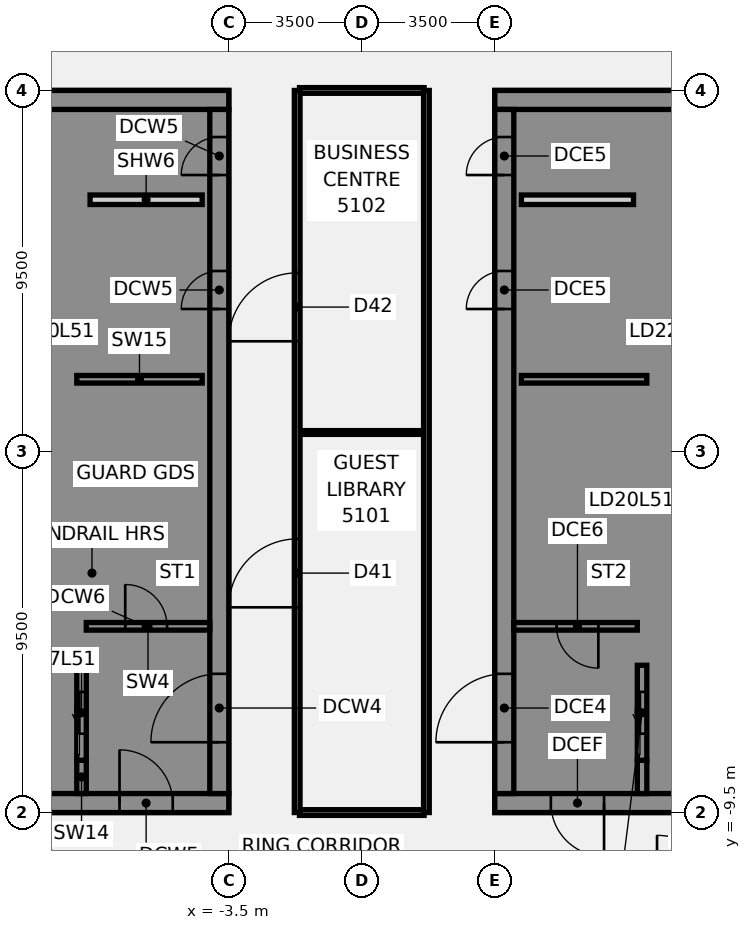
"""IFC4 building model, lengths in metres.
Left out: names, types, materials, properties, quantities, classifications, styles, units other than length and angle.
Written with IfcOpenShell. Run it as: python <this file> out.ifc"""

import sys

from ifc_helpers import new_model, si_unit, direction, frame, frame_2d, origin, place, context, subcontext, project, spatial, polyline, rectangle, outline, extrude, element, fill, save


model = new_model("IFC4")
c1 = context("Model", 3, precision=1e-05, world=origin(), true_north=direction((0.0, 1.0)))
c2 = subcontext(c1, "Body", "Model", "MODEL_VIEW")
j1 = project(units=[si_unit("LENGTHUNIT", "METRE"), si_unit("PLANEANGLEUNIT", "RADIAN")], contexts=[c1])
p1 = place(None, origin())
s1 = spatial("IfcSite", under=j1, at=p1, CompositionType="ELEMENT")
p2 = place(p1, origin())
s2 = spatial("IfcBuilding", under=s1, at=p2, CompositionType="ELEMENT")
p3 = place(p2, frame((0.0, 0.0, 204.1)))
s3 = spatial("IfcBuildingStorey", under=s2, at=p3, CompositionType="ELEMENT", Elevation=204.1)
p4 = place(p3, frame((-1.64, -9.5, 0.0), z_axis=(0.0, 0.0, 1.0), x_axis=(1.0, 0.0, 0.0)))
e1 = element("IfcWall", 1, at=p4, inside=s3, PredefinedType="PARTITIONING", context=c2, shape_type="SweptSolid", body=[
    extrude(rectangle(XDim=3.28, YDim=0.15, at=frame_2d((1.64, 0.0))), origin(), (0.0, 0.0, 1.0), 2.864),
])
p5 = place(p3, frame((-1.64, 0.5, 0.0), z_axis=(0.0, 0.0, 1.0), x_axis=(1.0, 0.0, 0.0)))
e2 = element("IfcWall", 2, at=p5, inside=s3, PredefinedType="PARTITIONING", context=c2, shape_type="SweptSolid", body=[
    extrude(rectangle(XDim=3.28, YDim=0.1, at=frame_2d((1.64, 0.0))), origin(), (0.0, 0.0, 1.0), 2.864),
])
p6 = place(p3, frame((-1.64, 9.5, 0.0), z_axis=(0.0, 0.0, 1.0), x_axis=(1.0, 0.0, 0.0)))
e3 = element("IfcWall", 3, at=p6, inside=s3, PredefinedType="PARTITIONING", context=c2, shape_type="SweptSolid", body=[
    extrude(rectangle(XDim=3.28, YDim=0.15, at=frame_2d((1.64, 0.0))), origin(), (0.0, 0.0, 1.0), 2.864),
])
p7 = place(p3, frame((-1.7, -9.5, 0.0), z_axis=(0.0, 0.0, 1.0), x_axis=(0.0, 1.0, 0.0)))
e4 = element("IfcWall", 4, at=p7, inside=s3, PredefinedType="PARTITIONING", context=c2, shape_type="SweptSolid", body=[
    extrude(rectangle(XDim=19.0, YDim=0.15, at=frame_2d((9.5, 0.0))), origin(), (0.0, 0.0, 1.0), 2.864),
])
p8 = place(p7, frame((5.4, 0.0, 0.0)))
e5 = element("IfcOpeningElement", 5, at=p8, cuts=e4, PredefinedType="OPENING", context=c2, shape_type="SweptSolid", body=[
    extrude(rectangle(XDim=1.8, YDim=2.1, at=frame_2d((0.9, 1.05))), frame((0.0, 0.085, 0.0), z_axis=(0.0, -1.0, 0.0), x_axis=(1.0, 0.0, 0.0)), (0.0, 0.0, 1.0), 0.17),
])
p9 = place(p7, frame((12.4, 0.0, 0.0)))
e6 = element("IfcOpeningElement", 6, at=p9, cuts=e4, PredefinedType="OPENING", context=c2, shape_type="SweptSolid", body=[
    extrude(rectangle(XDim=1.8, YDim=2.1, at=frame_2d((0.9, 1.05))), frame((0.0, 0.085, 0.0), z_axis=(0.0, -1.0, 0.0), x_axis=(1.0, 0.0, 0.0)), (0.0, 0.0, 1.0), 0.17),
])
p10 = place(p3, frame((1.7, -9.5, 0.0), z_axis=(0.0, 0.0, 1.0), x_axis=(0.0, 1.0, 0.0)))
e7 = element("IfcWall", 7, at=p10, inside=s3, PredefinedType="PARTITIONING", context=c2, shape_type="SweptSolid", body=[
    extrude(rectangle(XDim=19.0, YDim=0.15, at=frame_2d((9.5, 0.0))), origin(), (0.0, 0.0, 1.0), 2.864),
])
p11 = place(p3, frame((-16.5, -9.25, 0.0), z_axis=(0.0, 0.0, 1.0), x_axis=(1.0, 0.0, 0.0)))
e8 = element("IfcWall", 8, at=p11, inside=s3, PredefinedType="SHEAR", context=c2, shape_type="SweptSolid", body=[
    extrude(rectangle(XDim=13.0, YDim=0.5, at=frame_2d((6.5, 0.0))), origin(), (0.0, 0.0, 1.0), 3.46),
])
p12 = place(p11, frame((4.15, 0.0, 0.0)))
e9 = element("IfcOpeningElement", 9, at=p12, cuts=e8, PredefinedType="OPENING", context=c2, shape_type="SweptSolid", body=[
    extrude(rectangle(XDim=1.4, YDim=2.1, at=frame_2d((0.7, 1.05))), frame((0.0, 0.26, 0.0), z_axis=(0.0, -1.0, 0.0), x_axis=(1.0, 0.0, 0.0)), (0.0, 0.0, 1.0), 0.52),
])
p13 = place(p11, frame((10.125, 0.0, 0.0)))
e10 = element("IfcOpeningElement", 10, at=p13, cuts=e8, PredefinedType="OPENING", context=c2, shape_type="SweptSolid", body=[
    extrude(rectangle(XDim=1.4, YDim=2.1, at=frame_2d((0.7, 1.05))), frame((0.0, 0.26, 0.0), z_axis=(0.0, -1.0, 0.0), x_axis=(1.0, 0.0, 0.0)), (0.0, 0.0, 1.0), 0.52),
])
p14 = place(p3, frame((-16.5, 9.25, 0.0), z_axis=(0.0, 0.0, 1.0), x_axis=(1.0, 0.0, 0.0)))
e11 = element("IfcWall", 11, at=p14, inside=s3, PredefinedType="SHEAR", context=c2, shape_type="SweptSolid", body=[
    extrude(rectangle(XDim=13.0, YDim=0.5, at=frame_2d((6.5, 0.0))), origin(), (0.0, 0.0, 1.0), 3.46),
])
p15 = place(p3, origin())
e12 = element("IfcWall", 12, at=p15, inside=s3, PredefinedType="SHEAR", context=c2, shape_type="SweptSolid", body=[
    extrude(outline(polyline([(-9.8, -5.375), (-9.8, -5.625), (-7.5, -5.625), (-7.25, -5.625), (-7.25, 9.0), (-7.5, 9.0), (-9.8, 9.0), (-9.8, 8.125), (-7.5, 8.125), (-7.5, 5.625), (-9.8, 5.625), (-9.8, 5.375), (-7.5, 5.375), (-7.5, 2.875), (-9.8, 2.875), (-9.8, 2.625), (-7.5, 2.625), (-7.5, 0.125), (-9.8, 0.125), (-9.8, -0.125), (-7.5, -0.125), (-7.5, -2.625), (-9.8, -2.625), (-9.8, -2.875), (-7.5, -2.875), (-7.5, -5.375), (-9.8, -5.375)])), origin(), (0.0, 0.0, 1.0), 3.46),
])
p16 = place(p3, origin())
e13 = element("IfcWall", 13, at=p16, inside=s3, PredefinedType="SHEAR", context=c2, shape_type="SweptSolid", body=[
    extrude(outline(polyline([(-7.5, -8.125), (-9.55, -8.125), (-9.55, -5.625), (-9.8, -5.625), (-9.8, -8.125), (-9.8, -9.0), (-7.5, -9.0), (-7.5, -8.125)])), origin(), (0.0, 0.0, 1.0), 3.46),
])
p17 = place(p3, frame((-7.375, -9.0, 0.0), z_axis=(0.0, 0.0, 1.0), x_axis=(0.0, 1.0, 0.0)))
e14 = element("IfcWall", 14, at=p17, inside=s3, PredefinedType="SHEAR", context=c2, shape_type="SweptSolid", body=[
    extrude(rectangle(XDim=0.875, YDim=0.25, at=frame_2d((0.438, 0.0))), origin(), (0.0, 0.0, 1.0), 3.46),
])
p18 = place(p3, frame((-7.5, 1.9, 0.0), z_axis=(0.0, 0.0, 1.0), x_axis=(1.0, 0.0, 0.0)))
e15 = element("IfcWall", 15, at=p18, inside=s3, PredefinedType="SHEAR", context=c2, shape_type="SweptSolid", body=[
    extrude(rectangle(XDim=3.3, YDim=0.2, at=frame_2d((1.65, 0.0))), origin(), (0.0, 0.0, 1.0), 3.46),
])
p19 = place(p3, frame((-7.375, -8.125, 0.0), z_axis=(0.0, 0.0, 1.0), x_axis=(0.0, 1.0, 0.0)))
e16 = element("IfcWall", 16, at=p19, inside=s3, PredefinedType="SHEAR", context=c2, shape_type="SweptSolid", body=[
    extrude(rectangle(XDim=2.5, YDim=0.25, at=frame_2d((1.25, 0.0))), origin(), (0.0, 0.0, 1.0), 3.46),
])
p20 = place(p19, frame((0.7, 0.0, 0.0)))
e17 = element("IfcOpeningElement", 17, at=p20, cuts=e16, PredefinedType="OPENING", context=c2, shape_type="SweptSolid", body=[
    extrude(rectangle(XDim=1.1, YDim=2.1, at=frame_2d((0.55, 1.05))), frame((0.0, 0.135, 0.0), z_axis=(0.0, -1.0, 0.0), x_axis=(1.0, 0.0, 0.0)), (0.0, 0.0, 1.0), 0.27),
])
p21 = place(p3, frame((-3.75, -9.0, 0.0), z_axis=(0.0, 0.0, 1.0), x_axis=(0.0, 1.0, 0.0)))
e18 = element("IfcWall", 18, at=p21, inside=s3, PredefinedType="SHEAR", context=c2, shape_type="SweptSolid", body=[
    extrude(rectangle(XDim=18.0, YDim=0.5, at=frame_2d((9.0, 0.0))), origin(), (0.0, 0.0, 1.0), 3.46),
])
p22 = place(p21, frame((1.35, 0.0, 0.0)))
e19 = element("IfcOpeningElement", 19, at=p22, cuts=e18, PredefinedType="OPENING", context=c2, shape_type="SweptSolid", body=[
    extrude(rectangle(XDim=1.8, YDim=2.1, at=frame_2d((0.9, 1.05))), frame((0.0, 0.26, 0.0), z_axis=(0.0, -1.0, 0.0), x_axis=(1.0, 0.0, 0.0)), (0.0, 0.0, 1.0), 0.52),
])
p23 = place(p21, frame((12.75, 0.0, 0.0)))
e20 = element("IfcOpeningElement", 20, at=p23, cuts=e18, PredefinedType="OPENING", context=c2, shape_type="SweptSolid", body=[
    extrude(rectangle(XDim=1.0, YDim=2.1, at=frame_2d((0.5, 1.05))), frame((0.0, 0.26, 0.0), z_axis=(0.0, -1.0, 0.0), x_axis=(1.0, 0.0, 0.0)), (0.0, 0.0, 1.0), 0.52),
])
p24 = place(p21, frame((16.274, 0.0, 0.0)))
e21 = element("IfcOpeningElement", 21, at=p24, cuts=e18, PredefinedType="OPENING", context=c2, shape_type="SweptSolid", body=[
    extrude(rectangle(XDim=1.0, YDim=2.1, at=frame_2d((0.5, 1.05))), frame((0.0, 0.26, 0.0), z_axis=(0.0, -1.0, 0.0), x_axis=(1.0, 0.0, 0.0)), (0.0, 0.0, 1.0), 0.52),
])
p25 = place(p3, frame((-7.15, 6.624, 0.0), z_axis=(0.0, 0.0, 1.0), x_axis=(1.0, 0.0, 0.0)))
e22 = element("IfcWall", 22, at=p25, inside=s3, PredefinedType="PARTITIONING", context=c2, shape_type="SweptSolid", body=[
    extrude(rectangle(XDim=2.95, YDim=0.25, at=frame_2d((1.475, 0.0))), origin(), (0.0, 0.0, 1.0), 3.46),
])
p26 = place(p3, frame((-7.25, -4.6, 0.0), z_axis=(0.0, 0.0, 1.0), x_axis=(1.0, 0.0, 0.0)))
e23 = element("IfcWall", 23, at=p26, inside=s3, PredefinedType="SHEAR", context=c2, shape_type="SweptSolid", body=[
    extrude(rectangle(XDim=3.25, YDim=0.2, at=frame_2d((1.625, 0.0))), origin(), (0.0, 0.0, 1.0), 3.46),
])
p27 = place(p26, frame((1.025, 0.0, 0.0)))
e24 = element("IfcOpeningElement", 24, at=p27, cuts=e23, PredefinedType="OPENING", context=c2, shape_type="SweptSolid", body=[
    extrude(rectangle(XDim=1.1, YDim=2.1, at=frame_2d((0.55, 1.05))), frame((0.0, 0.11, 0.0), z_axis=(0.0, -1.0, 0.0), x_axis=(1.0, 0.0, 0.0)), (0.0, 0.0, 1.0), 0.22),
])
p28 = place(p3, frame((16.5, -9.25, 0.0), z_axis=(0.0, 0.0, 1.0), x_axis=(-1.0, 0.0, 0.0)))
e25 = element("IfcWall", 25, at=p28, inside=s3, PredefinedType="SHEAR", context=c2, shape_type="SweptSolid", body=[
    extrude(rectangle(XDim=13.0, YDim=0.5, at=frame_2d((6.5, 0.0))), origin(), (0.0, 0.0, 1.0), 3.46),
])
p29 = place(p28, frame((4.15, 0.0, 0.0)))
e26 = element("IfcOpeningElement", 26, at=p29, cuts=e25, PredefinedType="OPENING", context=c2, shape_type="SweptSolid", body=[
    extrude(rectangle(XDim=1.4, YDim=2.1, at=frame_2d((0.7, 1.05))), frame((0.0, 0.26, 0.0), z_axis=(0.0, -1.0, 0.0), x_axis=(1.0, 0.0, 0.0)), (0.0, 0.0, 1.0), 0.52),
])
p30 = place(p28, frame((10.125, 0.0, 0.0)))
e27 = element("IfcOpeningElement", 27, at=p30, cuts=e25, PredefinedType="OPENING", context=c2, shape_type="SweptSolid", body=[
    extrude(rectangle(XDim=1.4, YDim=2.1, at=frame_2d((0.7, 1.05))), frame((0.0, 0.26, 0.0), z_axis=(0.0, -1.0, 0.0), x_axis=(1.0, 0.0, 0.0)), (0.0, 0.0, 1.0), 0.52),
])
p31 = place(p3, frame((16.5, 9.25, 0.0), z_axis=(0.0, 0.0, 1.0), x_axis=(-1.0, 0.0, 0.0)))
e28 = element("IfcWall", 28, at=p31, inside=s3, PredefinedType="SHEAR", context=c2, shape_type="SweptSolid", body=[
    extrude(rectangle(XDim=13.0, YDim=0.5, at=frame_2d((6.5, 0.0))), origin(), (0.0, 0.0, 1.0), 3.46),
])
p32 = place(p3, origin())
e29 = element("IfcWall", 29, at=p32, inside=s3, PredefinedType="SHEAR", context=c2, shape_type="SweptSolid", body=[
    extrude(outline(polyline([(9.8, -5.375), (7.5, -5.375), (7.5, -2.875), (9.8, -2.875), (9.8, -2.625), (7.5, -2.625), (7.5, -0.125), (9.8, -0.125), (9.8, 0.125), (7.5, 0.125), (7.5, 2.625), (9.8, 2.625), (9.8, 2.875), (7.5, 2.875), (7.5, 5.375), (9.8, 5.375), (9.8, 5.625), (7.5, 5.625), (7.5, 8.125), (9.8, 8.125), (9.8, 9.0), (7.5, 9.0), (7.25, 9.0), (7.25, -5.625), (7.5, -5.625), (9.8, -5.625), (9.8, -5.375)])), origin(), (0.0, 0.0, 1.0), 3.46),
])
p33 = place(p3, origin())
e30 = element("IfcWall", 30, at=p33, inside=s3, PredefinedType="SHEAR", context=c2, shape_type="SweptSolid", body=[
    extrude(outline(polyline([(7.5, -8.125), (7.5, -9.0), (9.8, -9.0), (9.8, -8.125), (9.8, -5.625), (9.55, -5.625), (9.55, -8.125), (7.5, -8.125)])), origin(), (0.0, 0.0, 1.0), 3.46),
])
p34 = place(p3, frame((7.375, -9.0, 0.0), z_axis=(0.0, 0.0, 1.0), x_axis=(0.0, 1.0, 0.0)))
e31 = element("IfcWall", 31, at=p34, inside=s3, PredefinedType="SHEAR", context=c2, shape_type="SweptSolid", body=[
    extrude(rectangle(XDim=0.875, YDim=0.25, at=frame_2d((0.438, 0.0))), origin(), (0.0, 0.0, 1.0), 3.46),
])
p35 = place(p3, frame((7.5, 1.9, 0.0), z_axis=(0.0, 0.0, 1.0), x_axis=(-1.0, 0.0, 0.0)))
e32 = element("IfcWall", 32, at=p35, inside=s3, PredefinedType="SHEAR", context=c2, shape_type="SweptSolid", body=[
    extrude(rectangle(XDim=3.3, YDim=0.2, at=frame_2d((1.65, 0.0))), origin(), (0.0, 0.0, 1.0), 3.46),
])
p36 = place(p3, frame((7.375, -8.125, 0.0), z_axis=(0.0, 0.0, 1.0), x_axis=(0.0, 1.0, 0.0)))
e33 = element("IfcWall", 33, at=p36, inside=s3, PredefinedType="SHEAR", context=c2, shape_type="SweptSolid", body=[
    extrude(rectangle(XDim=2.5, YDim=0.25, at=frame_2d((1.25, 0.0))), origin(), (0.0, 0.0, 1.0), 3.46),
])
p37 = place(p36, frame((0.7, 0.0, 0.0)))
e34 = element("IfcOpeningElement", 34, at=p37, cuts=e33, PredefinedType="OPENING", context=c2, shape_type="SweptSolid", body=[
    extrude(rectangle(XDim=1.1, YDim=2.1, at=frame_2d((0.55, 1.05))), frame((0.0, 0.135, 0.0), z_axis=(0.0, -1.0, 0.0), x_axis=(1.0, 0.0, 0.0)), (0.0, 0.0, 1.0), 0.27),
])
p38 = place(p3, frame((3.75, -9.0, 0.0), z_axis=(0.0, 0.0, 1.0), x_axis=(0.0, 1.0, 0.0)))
e35 = element("IfcWall", 35, at=p38, inside=s3, PredefinedType="SHEAR", context=c2, shape_type="SweptSolid", body=[
    extrude(rectangle(XDim=18.0, YDim=0.5, at=frame_2d((9.0, 0.0))), origin(), (0.0, 0.0, 1.0), 3.46),
])
p39 = place(p38, frame((1.35, 0.0, 0.0)))
e36 = element("IfcOpeningElement", 36, at=p39, cuts=e35, PredefinedType="OPENING", context=c2, shape_type="SweptSolid", body=[
    extrude(rectangle(XDim=1.8, YDim=2.1, at=frame_2d((0.9, 1.05))), frame((0.0, 0.26, 0.0), z_axis=(0.0, -1.0, 0.0), x_axis=(1.0, 0.0, 0.0)), (0.0, 0.0, 1.0), 0.52),
])
p40 = place(p38, frame((12.75, 0.0, 0.0)))
e37 = element("IfcOpeningElement", 37, at=p40, cuts=e35, PredefinedType="OPENING", context=c2, shape_type="SweptSolid", body=[
    extrude(rectangle(XDim=1.0, YDim=2.1, at=frame_2d((0.5, 1.05))), frame((0.0, 0.26, 0.0), z_axis=(0.0, -1.0, 0.0), x_axis=(1.0, 0.0, 0.0)), (0.0, 0.0, 1.0), 0.52),
])
p41 = place(p38, frame((16.274, 0.0, 0.0)))
e38 = element("IfcOpeningElement", 38, at=p41, cuts=e35, PredefinedType="OPENING", context=c2, shape_type="SweptSolid", body=[
    extrude(rectangle(XDim=1.0, YDim=2.1, at=frame_2d((0.5, 1.05))), frame((0.0, 0.26, 0.0), z_axis=(0.0, -1.0, 0.0), x_axis=(1.0, 0.0, 0.0)), (0.0, 0.0, 1.0), 0.52),
])
p42 = place(p3, frame((7.15, 6.624, 0.0), z_axis=(0.0, 0.0, 1.0), x_axis=(-1.0, 0.0, 0.0)))
e39 = element("IfcWall", 39, at=p42, inside=s3, PredefinedType="PARTITIONING", context=c2, shape_type="SweptSolid", body=[
    extrude(rectangle(XDim=2.95, YDim=0.25, at=frame_2d((1.475, 0.0))), origin(), (0.0, 0.0, 1.0), 3.46),
])
p43 = place(p3, frame((7.25, -4.6, 0.0), z_axis=(0.0, 0.0, 1.0), x_axis=(-1.0, 0.0, 0.0)))
e40 = element("IfcWall", 40, at=p43, inside=s3, PredefinedType="SHEAR", context=c2, shape_type="SweptSolid", body=[
    extrude(rectangle(XDim=3.25, YDim=0.2, at=frame_2d((1.625, 0.0))), origin(), (0.0, 0.0, 1.0), 3.46),
])
p44 = place(p43, frame((1.025, 0.0, 0.0)))
e41 = element("IfcOpeningElement", 41, at=p44, cuts=e40, PredefinedType="OPENING", context=c2, shape_type="SweptSolid", body=[
    extrude(rectangle(XDim=1.1, YDim=2.1, at=frame_2d((0.55, 1.05))), frame((0.0, 0.11, 0.0), z_axis=(0.0, -1.0, 0.0), x_axis=(1.0, 0.0, 0.0)), (0.0, 0.0, 1.0), 0.22),
])
p45 = place(p8, frame((1.8, 0.0, 0.0), z_axis=(0.0, 0.0, 1.0), x_axis=(-1.0, 0.0, 0.0)))
e42 = element("IfcDoor", 42, at=p45, inside=s3, OperationType="DOUBLE_DOOR_SINGLE_SWING", PredefinedType="DOOR", context=c2, shape_type="SweptSolid", body=[
    extrude(rectangle(XDim=1.8, YDim=2.1, at=frame_2d((0.9, 1.05))), frame((0.0, 0.025, 0.0), z_axis=(0.0, -1.0, 0.0), x_axis=(1.0, 0.0, 0.0)), (0.0, 0.0, 1.0), 0.05),
])
fill(e5, e42)
p46 = place(p9, frame((1.8, 0.0, 0.0), z_axis=(0.0, 0.0, 1.0), x_axis=(-1.0, 0.0, 0.0)))
e43 = element("IfcDoor", 43, at=p46, inside=s3, OperationType="DOUBLE_DOOR_SINGLE_SWING", PredefinedType="DOOR", context=c2, shape_type="SweptSolid", body=[
    extrude(rectangle(XDim=1.8, YDim=2.1, at=frame_2d((0.9, 1.05))), frame((0.0, 0.025, 0.0), z_axis=(0.0, -1.0, 0.0), x_axis=(1.0, 0.0, 0.0)), (0.0, 0.0, 1.0), 0.05),
])
fill(e6, e43)
p47 = place(p13, origin())
e44 = element("IfcDoor", 44, at=p47, inside=s3, OperationType="SINGLE_SWING_LEFT", PredefinedType="DOOR", context=c2, shape_type="SweptSolid", body=[
    extrude(rectangle(XDim=1.4, YDim=2.1, at=frame_2d((0.7, 1.05))), frame((0.0, 0.025, 0.0), z_axis=(0.0, -1.0, 0.0), x_axis=(1.0, 0.0, 0.0)), (0.0, 0.0, 1.0), 0.05),
])
fill(e10, e44)
p48 = place(p22, origin())
e45 = element("IfcDoor", 45, at=p48, inside=s3, OperationType="SINGLE_SWING_LEFT", PredefinedType="DOOR", context=c2, shape_type="SweptSolid", body=[
    extrude(rectangle(XDim=1.8, YDim=2.1, at=frame_2d((0.9, 1.05))), frame((0.0, 0.025, 0.0), z_axis=(0.0, -1.0, 0.0), x_axis=(1.0, 0.0, 0.0)), (0.0, 0.0, 1.0), 0.05),
])
fill(e19, e45)
p49 = place(p23, origin())
e46 = element("IfcDoor", 46, at=p49, inside=s3, OperationType="SINGLE_SWING_LEFT", PredefinedType="DOOR", context=c2, shape_type="SweptSolid", body=[
    extrude(rectangle(XDim=1.0, YDim=2.1, at=frame_2d((0.5, 1.05))), frame((0.0, 0.225, 0.0), z_axis=(0.0, -1.0, 0.0), x_axis=(1.0, 0.0, 0.0)), (0.0, 0.0, 1.0), 0.05),
])
fill(e20, e46)
p50 = place(p24, origin())
e47 = element("IfcDoor", 47, at=p50, inside=s3, OperationType="SINGLE_SWING_LEFT", PredefinedType="DOOR", context=c2, shape_type="SweptSolid", body=[
    extrude(rectangle(XDim=1.0, YDim=2.1, at=frame_2d((0.5, 1.05))), frame((0.0, 0.225, 0.0), z_axis=(0.0, -1.0, 0.0), x_axis=(1.0, 0.0, 0.0)), (0.0, 0.0, 1.0), 0.05),
])
fill(e21, e47)
p51 = place(p27, origin())
e48 = element("IfcDoor", 48, at=p51, inside=s3, OperationType="SINGLE_SWING_LEFT", PredefinedType="DOOR", context=c2, shape_type="SweptSolid", body=[
    extrude(rectangle(XDim=1.1, YDim=2.1, at=frame_2d((0.55, 1.05))), frame((0.0, 0.025, 0.0), z_axis=(0.0, -1.0, 0.0), x_axis=(1.0, 0.0, 0.0)), (0.0, 0.0, 1.0), 0.05),
])
fill(e24, e48)
p52 = place(p20, origin())
e49 = element("IfcDoor", 49, at=p52, inside=s3, OperationType="SLIDING_TO_LEFT", PredefinedType="DOOR", context=c2, shape_type="SweptSolid", body=[
    extrude(rectangle(XDim=1.1, YDim=2.1, at=frame_2d((0.55, 1.05))), frame((0.0, 0.025, 0.0), z_axis=(0.0, -1.0, 0.0), x_axis=(1.0, 0.0, 0.0)), (0.0, 0.0, 1.0), 0.05),
])
fill(e17, e49)
p53 = place(p30, origin())
e50 = element("IfcDoor", 50, at=p53, inside=s3, OperationType="SINGLE_SWING_LEFT", PredefinedType="DOOR", context=c2, shape_type="SweptSolid", body=[
    extrude(rectangle(XDim=1.4, YDim=2.1, at=frame_2d((0.7, 1.05))), frame((0.0, 0.025, 0.0), z_axis=(0.0, -1.0, 0.0), x_axis=(1.0, 0.0, 0.0)), (0.0, 0.0, 1.0), 0.05),
])
fill(e27, e50)
p54 = place(p39, origin())
e51 = element("IfcDoor", 51, at=p54, inside=s3, OperationType="SINGLE_SWING_LEFT", PredefinedType="DOOR", context=c2, shape_type="SweptSolid", body=[
    extrude(rectangle(XDim=1.8, YDim=2.1, at=frame_2d((0.9, 1.05))), frame((0.0, 0.025, 0.0), z_axis=(0.0, -1.0, 0.0), x_axis=(1.0, 0.0, 0.0)), (0.0, 0.0, 1.0), 0.05),
])
fill(e36, e51)
p55 = place(p40, origin())
e52 = element("IfcDoor", 52, at=p55, inside=s3, OperationType="SINGLE_SWING_LEFT", PredefinedType="DOOR", context=c2, shape_type="SweptSolid", body=[
    extrude(rectangle(XDim=1.0, YDim=2.1, at=frame_2d((0.5, 1.05))), frame((0.0, -0.175, 0.0), z_axis=(0.0, -1.0, 0.0), x_axis=(1.0, 0.0, 0.0)), (0.0, 0.0, 1.0), 0.05),
])
fill(e37, e52)
p56 = place(p41, origin())
e53 = element("IfcDoor", 53, at=p56, inside=s3, OperationType="SINGLE_SWING_LEFT", PredefinedType="DOOR", context=c2, shape_type="SweptSolid", body=[
    extrude(rectangle(XDim=1.0, YDim=2.1, at=frame_2d((0.5, 1.05))), frame((0.0, -0.175, 0.0), z_axis=(0.0, -1.0, 0.0), x_axis=(1.0, 0.0, 0.0)), (0.0, 0.0, 1.0), 0.05),
])
fill(e38, e53)
p57 = place(p44, origin())
e54 = element("IfcDoor", 54, at=p57, inside=s3, OperationType="SINGLE_SWING_LEFT", PredefinedType="DOOR", context=c2, shape_type="SweptSolid", body=[
    extrude(rectangle(XDim=1.1, YDim=2.1, at=frame_2d((0.55, 1.05))), frame((0.0, 0.025, 0.0), z_axis=(0.0, -1.0, 0.0), x_axis=(1.0, 0.0, 0.0)), (0.0, 0.0, 1.0), 0.05),
])
fill(e41, e54)
p58 = place(p37, origin())
e55 = element("IfcDoor", 55, at=p58, inside=s3, OperationType="SLIDING_TO_LEFT", PredefinedType="DOOR", context=c2, shape_type="SweptSolid", body=[
    extrude(rectangle(XDim=1.1, YDim=2.1, at=frame_2d((0.55, 1.05))), frame((0.0, 0.025, 0.0), z_axis=(0.0, -1.0, 0.0), x_axis=(1.0, 0.0, 0.0)), (0.0, 0.0, 1.0), 0.05),
])
fill(e34, e55)
save(model, sys.argv[1])
